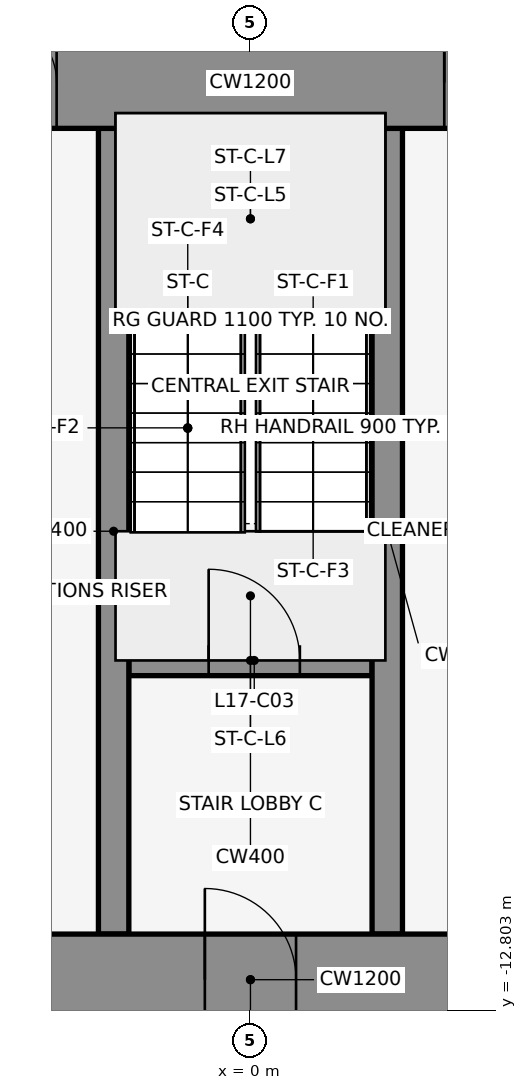
"""IFC4 building model, lengths in metres.
Left out: names, types, materials, properties, quantities, classifications, styles, units other than length and angle.
Written with IfcOpenShell. Run it as: python <this file> out.ifc"""

import sys

from ifc_helpers import new_model, si_unit, direction, frame, frame_2d, origin, place, context, subcontext, project, spatial, rectangle, extrude, element, fill, save


model = new_model("IFC4")
c1 = context("Model", 3, precision=1e-05, world=origin(), true_north=direction((0.0, 1.0)))
c2 = subcontext(c1, "Body", "Model", "MODEL_VIEW")
j1 = project(units=[si_unit("LENGTHUNIT", "METRE"), si_unit("PLANEANGLEUNIT", "RADIAN")], contexts=[c1])
p1 = place(None, origin())
s1 = spatial("IfcSite", under=j1, at=p1, CompositionType="ELEMENT")
p2 = place(p1, origin())
s2 = spatial("IfcBuilding", under=s1, at=p2, CompositionType="ELEMENT")
p3 = place(p2, frame((0.0, 0.0, 84.5)))
s3 = spatial("IfcBuildingStorey", under=s2, at=p3, CompositionType="ELEMENT", Elevation=84.5)
for number, where, z_axis, x_axis in (
    (1, (1.901, 1.08, 0.0), (0.0, 0.0, 1.0), (-0.84, -0.543, 0.0)),
    (2, (-0.068, -0.105, 0.0), (0.0, 0.0, 1.0), (-0.84, 0.543, 0.0)),
):
    element("IfcWall", number, at=place(p3, frame(where, z_axis=z_axis, x_axis=x_axis)), inside=s3, PredefinedType="STANDARD", context=c2, shape_type="SweptSolid", body=[
        extrude(rectangle(XDim=2.183, YDim=0.25, at=frame_2d((1.091, 0.0))), origin(), (0.0, 0.0, 1.0), 5.25),
    ])
p4 = place(p3, frame((-1.6, -8.2, 0.0), z_axis=(0.0, 0.0, 1.0), x_axis=(1.0, 0.0, 0.0)))
e3 = element("IfcWall", 3, at=p4, inside=s3, PredefinedType="SHEAR", context=c2, shape_type="SweptSolid", body=[
    extrude(rectangle(XDim=3.2, YDim=0.4, at=frame_2d((1.6, 0.0))), origin(), (0.0, 0.0, 1.0), 5.4),
])
p5 = place(p4, frame((1.05, 0.0, 0.0)))
e4 = element("IfcOpeningElement", 4, at=p5, cuts=e3, PredefinedType="OPENING", context=c2, shape_type="SweptSolid", body=[
    extrude(rectangle(XDim=1.2, YDim=2.1, at=frame_2d((0.6, 1.05))), frame((0.0, 0.212, 0.0), z_axis=(0.0, -1.0, 0.0), x_axis=(1.0, 0.0, 0.0)), (0.0, 0.0, 1.0), 0.424),
])
for number, where, z_axis, x_axis in (
    (5, (-1.8, -11.8, 0.0), (0.0, 0.0, 1.0), (0.0, 1.0, 0.0)),
    (6, (1.8, -11.8, 0.0), (0.0, 0.0, 1.0), (0.0, 1.0, 0.0)),
):
    element("IfcWall", number, at=place(p3, frame(where, z_axis=z_axis, x_axis=x_axis)), inside=s3, PredefinedType="SHEAR", context=c2, shape_type="SweptSolid", body=[
        extrude(rectangle(XDim=10.6, YDim=0.4, at=frame_2d((5.3, 0.0))), origin(), (0.0, 0.0, 1.0), 5.4),
    ])
p6 = place(p3, frame((-22.0, -0.6, 0.0), z_axis=(0.0, 0.0, 1.0), x_axis=(1.0, 0.0, 0.0)))
e7 = element("IfcWall", 7, at=p6, inside=s3, PredefinedType="SHEAR", context=c2, shape_type="SweptSolid", body=[
    extrude(rectangle(XDim=44.0, YDim=1.2, at=frame_2d((22.0, 0.0))), origin(), (0.0, 0.0, 1.0), 5.4),
])
p7 = place(p6, frame((18.55, 0.0, 0.0)))
e8 = element("IfcOpeningElement", 8, at=p7, cuts=e7, PredefinedType="OPENING", context=c2, shape_type="SweptSolid", body=[
    extrude(rectangle(XDim=0.9, YDim=2.1, at=frame_2d((0.45, 1.05))), frame((0.0, 0.612, 0.0), z_axis=(0.0, -1.0, 0.0), x_axis=(1.0, 0.0, 0.0)), (0.0, 0.0, 1.0), 1.224),
])
p8 = place(p6, frame((24.55, 0.0, 0.0)))
e9 = element("IfcOpeningElement", 9, at=p8, cuts=e7, PredefinedType="OPENING", context=c2, shape_type="SweptSolid", body=[
    extrude(rectangle(XDim=0.9, YDim=2.1, at=frame_2d((0.45, 1.05))), frame((0.0, 0.612, 0.0), z_axis=(0.0, -1.0, 0.0), x_axis=(1.0, 0.0, 0.0)), (0.0, 0.0, 1.0), 1.224),
])
p9 = place(p3, frame((-22.0, -12.4, 0.0), z_axis=(0.0, 0.0, 1.0), x_axis=(1.0, 0.0, 0.0)))
e10 = element("IfcWall", 10, at=p9, inside=s3, PredefinedType="SHEAR", context=c2, shape_type="SweptSolid", body=[
    extrude(rectangle(XDim=44.0, YDim=1.2, at=frame_2d((22.0, 0.0))), origin(), (0.0, 0.0, 1.0), 5.4),
])
p10 = place(p9, frame((2.2, 0.0, 0.0)))
e11 = element("IfcOpeningElement", 11, at=p10, cuts=e10, PredefinedType="OPENING", context=c2, shape_type="SweptSolid", body=[
    extrude(rectangle(XDim=1.2, YDim=2.1, at=frame_2d((0.6, 1.05))), frame((0.0, 0.612, 0.0), z_axis=(0.0, -1.0, 0.0), x_axis=(1.0, 0.0, 0.0)), (0.0, 0.0, 1.0), 1.224),
])
p11 = place(p9, frame((21.4, 0.0, 0.0)))
e12 = element("IfcOpeningElement", 12, at=p11, cuts=e10, PredefinedType="OPENING", context=c2, shape_type="SweptSolid", body=[
    extrude(rectangle(XDim=1.2, YDim=2.1, at=frame_2d((0.6, 1.05))), frame((0.0, 0.612, 0.0), z_axis=(0.0, -1.0, 0.0), x_axis=(1.0, 0.0, 0.0)), (0.0, 0.0, 1.0), 1.224),
])
p12 = place(p9, frame((40.6, 0.0, 0.0)))
e13 = element("IfcOpeningElement", 13, at=p12, cuts=e10, PredefinedType="OPENING", context=c2, shape_type="SweptSolid", body=[
    extrude(rectangle(XDim=1.2, YDim=2.1, at=frame_2d((0.6, 1.05))), frame((0.0, 0.612, 0.0), z_axis=(0.0, -1.0, 0.0), x_axis=(1.0, 0.0, 0.0)), (0.0, 0.0, 1.0), 1.224),
])
p13 = place(p9, frame((16.0, 0.0, 0.0)))
e14 = element("IfcOpeningElement", 14, at=p13, cuts=e10, PredefinedType="OPENING", context=c2, shape_type="SweptSolid", body=[
    extrude(rectangle(XDim=1.8, YDim=2.1, at=frame_2d((0.9, 1.05))), frame((0.0, 0.612, 0.0), z_axis=(0.0, -1.0, 0.0), x_axis=(1.0, 0.0, 0.0)), (0.0, 0.0, 1.0), 1.224),
])
p14 = place(p9, frame((6.3, 0.0, 0.0)))
e15 = element("IfcOpeningElement", 15, at=p14, cuts=e10, PredefinedType="OPENING", context=c2, shape_type="SweptSolid", body=[
    extrude(rectangle(XDim=1.2, YDim=2.1, at=frame_2d((0.6, 1.05))), frame((0.0, 0.612, 0.0), z_axis=(0.0, -1.0, 0.0), x_axis=(1.0, 0.0, 0.0)), (0.0, 0.0, 1.0), 1.224),
])
p15 = place(p9, frame((26.2, 0.0, 0.0)))
e16 = element("IfcOpeningElement", 16, at=p15, cuts=e10, PredefinedType="OPENING", context=c2, shape_type="SweptSolid", body=[
    extrude(rectangle(XDim=1.8, YDim=2.1, at=frame_2d((0.9, 1.05))), frame((0.0, 0.612, 0.0), z_axis=(0.0, -1.0, 0.0), x_axis=(1.0, 0.0, 0.0)), (0.0, 0.0, 1.0), 1.224),
])
p16 = place(p9, frame((36.5, 0.0, 0.0)))
e17 = element("IfcOpeningElement", 17, at=p16, cuts=e10, PredefinedType="OPENING", context=c2, shape_type="SweptSolid", body=[
    extrude(rectangle(XDim=1.2, YDim=2.1, at=frame_2d((0.6, 1.05))), frame((0.0, 0.612, 0.0), z_axis=(0.0, -1.0, 0.0), x_axis=(1.0, 0.0, 0.0)), (0.0, 0.0, 1.0), 1.224),
])
p17 = place(p5, origin())
e18 = element("IfcDoor", 18, at=p17, inside=s3, OperationType="SINGLE_SWING_LEFT", PredefinedType="DOOR", context=c2, shape_type="SweptSolid", body=[
    extrude(rectangle(XDim=1.2, YDim=2.1, at=frame_2d((0.6, 1.05))), frame((0.0, 0.025, 0.0), z_axis=(0.0, -1.0, 0.0), x_axis=(1.0, 0.0, 0.0)), (0.0, 0.0, 1.0), 0.05),
])
fill(e4, e18)
p18 = place(p7, origin())
e19 = element("IfcDoor", 19, at=p18, inside=s3, OperationType="SINGLE_SWING_LEFT", PredefinedType="DOOR", context=c2, shape_type="SweptSolid", body=[
    extrude(rectangle(XDim=0.9, YDim=2.1, at=frame_2d((0.45, 1.05))), frame((0.0, 0.025, 0.0), z_axis=(0.0, -1.0, 0.0), x_axis=(1.0, 0.0, 0.0)), (0.0, 0.0, 1.0), 0.05),
])
fill(e8, e19)
p19 = place(p8, origin())
e20 = element("IfcDoor", 20, at=p19, inside=s3, OperationType="SINGLE_SWING_LEFT", PredefinedType="DOOR", context=c2, shape_type="SweptSolid", body=[
    extrude(rectangle(XDim=0.9, YDim=2.1, at=frame_2d((0.45, 1.05))), frame((0.0, 0.025, 0.0), z_axis=(0.0, -1.0, 0.0), x_axis=(1.0, 0.0, 0.0)), (0.0, 0.0, 1.0), 0.05),
])
fill(e9, e20)
p20 = place(p11, frame((1.2, 0.0, 0.0), z_axis=(0.0, 0.0, 1.0), x_axis=(-1.0, 0.0, 0.0)))
e21 = element("IfcDoor", 21, at=p20, inside=s3, OperationType="SINGLE_SWING_RIGHT", PredefinedType="DOOR", context=c2, shape_type="SweptSolid", body=[
    extrude(rectangle(XDim=1.2, YDim=2.1, at=frame_2d((0.6, 1.05))), frame((0.0, 0.025, 0.0), z_axis=(0.0, -1.0, 0.0), x_axis=(1.0, 0.0, 0.0)), (0.0, 0.0, 1.0), 0.05),
])
fill(e12, e21)
save(model, sys.argv[1])
